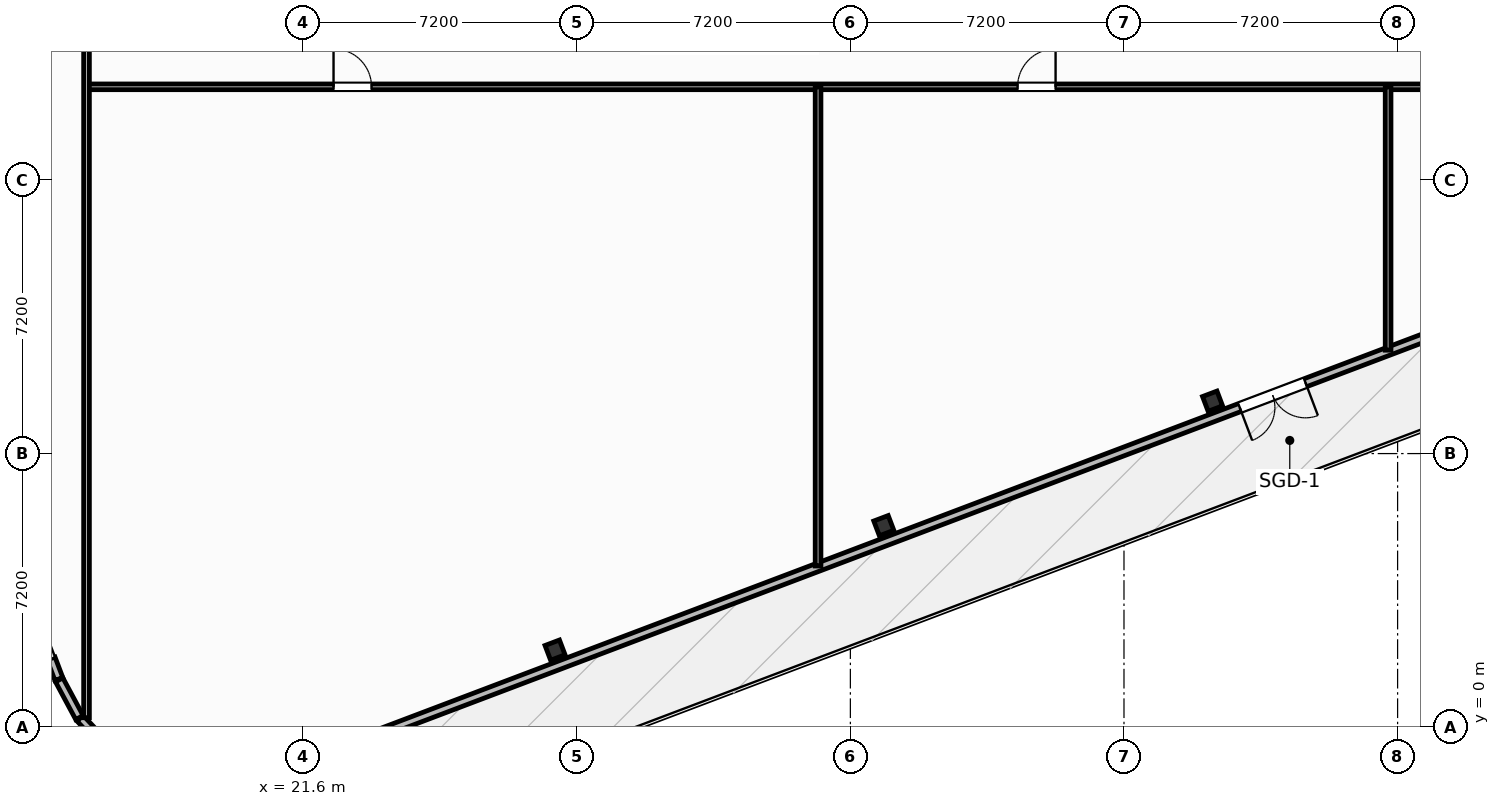
"""IFC4 building model, lengths in metres.
Left out: names, types, materials, properties, quantities, classifications, styles, units other than length and angle.
Written with IfcOpenShell. Run it as: python <this file> out.ifc"""

import sys

from ifc_helpers import new_model, si_unit, direction, frame, frame_2d, origin, origin_2d, place, context, subcontext, project, spatial, rectangle, i_section, extrude, element, fill, save


model = new_model("IFC4")
c1 = context("Model", 3, precision=1e-05, world=origin(), true_north=direction((0.0, 1.0)))
c2 = subcontext(c1, "Body", "Model", "MODEL_VIEW")
j1 = project(units=[si_unit("LENGTHUNIT", "METRE"), si_unit("PLANEANGLEUNIT", "RADIAN")], contexts=[c1])
p1 = place(None, origin())
s1 = spatial("IfcSite", under=j1, at=p1, CompositionType="ELEMENT")
p2 = place(p1, origin())
s2 = spatial("IfcBuilding", under=s1, at=p2, CompositionType="ELEMENT")
p3 = place(p2, frame((0.0, 0.0, 207.9)))
s3 = spatial("IfcBuildingStorey", under=s2, at=p3, CompositionType="ELEMENT", Elevation=207.9)
for number, where, z_axis, x_axis in (
    (1, (28.229, 2.028, -0.32), (0.0, 0.0, 1.0), (0.935, 0.354, 0.0)),
    (2, (36.88, 5.303, -0.32), (0.0, 0.0, 1.0), (0.935, 0.354, 0.0)),
    (3, (45.531, 8.578, -0.32), (0.0, 0.0, 1.0), (0.935, 0.354, 0.0)),
):
    element("IfcColumn", number, at=place(p3, frame(where, z_axis=z_axis, x_axis=x_axis)), inside=s3, PredefinedType="COLUMN", context=c2, shape_type="SweptSolid", body=[
        extrude(i_section(OverallWidth=0.406, OverallDepth=0.416, WebThickness=0.03, FlangeThickness=0.048, FilletRadius=0.025, at=origin_2d()), origin(), (0.0, 0.0, 1.0), 5.12),
    ])
p4 = place(p3, frame((70.085, 17.436, 0.0), z_axis=(0.0, 0.0, 1.0), x_axis=(-0.935222646765, -0.354060165759, 0.0)))
e4 = element("IfcWall", 4, at=p4, inside=s3, PredefinedType="SOLIDWALL", context=c2, shape_type="SweptSolid", body=[
    extrude(rectangle(XDim=52.2, YDim=0.22, at=frame_2d((26.1, 0.0))), origin(), (0.0, 0.0, 1.0), 3.83),
])
p5 = place(p4, frame((23.64, 0.0, 0.0)))
e5 = element("IfcOpeningElement", 5, at=p5, cuts=e4, PredefinedType="OPENING", context=c2, shape_type="SweptSolid", body=[
    extrude(rectangle(XDim=1.85, YDim=2.3, at=frame_2d((0.925, 1.15))), frame((0.0, 0.12, 0.0), z_axis=(0.0, -1.0, 0.0), x_axis=(1.0, 0.0, 0.0)), (0.0, 0.0, 1.0), 0.24),
])
p6 = place(p4, frame((0.55, 0.0, 0.75)))
e6 = element("IfcOpeningElement", 6, at=p6, cuts=e4, PredefinedType="OPENING", context=c2, shape_type="SweptSolid", body=[
    extrude(rectangle(XDim=1.85, YDim=1.75, at=frame_2d((0.925, 0.875))), frame((0.0, 0.12, 0.0), z_axis=(0.0, -1.0, 0.0), x_axis=(1.0, 0.0, 0.0)), (0.0, 0.0, 1.0), 0.24),
])
p7 = place(p4, frame((49.8, 0.0, 0.75)))
e7 = element("IfcOpeningElement", 7, at=p7, cuts=e4, PredefinedType="OPENING", context=c2, shape_type="SweptSolid", body=[
    extrude(rectangle(XDim=1.85, YDim=1.75, at=frame_2d((0.925, 0.875))), frame((0.0, 0.12, 0.0), z_axis=(0.0, -1.0, 0.0), x_axis=(1.0, 0.0, 0.0)), (0.0, 0.0, 1.0), 0.24),
])
p8 = place(p3, frame((15.181, 1.245, 0.0), z_axis=(0.0, 0.0, 1.0), x_axis=(0.473154714138, -0.880979350773, 0.0)))
e8 = element("IfcWall", 8, at=p8, inside=s3, PredefinedType="SOLIDWALL", context=c2, shape_type="SweptSolid", body=[
    extrude(rectangle(XDim=1.125, YDim=0.22, at=frame_2d((0.562, 0.0))), origin(), (0.0, 0.0, 1.0), 3.83),
])
p9 = place(p3, frame((15.73, 0.236, 0.0), z_axis=(0.0, 0.0, 1.0), x_axis=(0.684974096147, -0.728567421456, 0.0)))
e9 = element("IfcWall", 9, at=p9, inside=s3, PredefinedType="SOLIDWALL", context=c2, shape_type="SweptSolid", body=[
    extrude(rectangle(XDim=1.092, YDim=0.22, at=frame_2d((0.546, 0.0))), origin(), (0.0, 0.0, 1.0), 3.83),
])
p10 = place(p3, frame((14.968, 1.809, 0.0), z_axis=(0.0, 0.0, 1.0), x_axis=(0.354042098677, -0.935229486471, 0.0)))
e10 = element("IfcWall", 10, at=p10, inside=s3, PredefinedType="SOLIDWALL", context=c2, shape_type="SweptSolid", body=[
    extrude(rectangle(XDim=0.577, YDim=0.22, at=frame_2d((0.289, 0.0))), origin(), (0.0, 0.0, 1.0), 3.83),
])
p11 = place(p3, frame((15.9, 16.85, 0.0), z_axis=(0.0, 0.0, 1.0), x_axis=(1.0, 0.0, 0.0)))
e11 = element("IfcWall", 11, at=p11, inside=s3, PredefinedType="PARTITIONING", context=c2, shape_type="SweptSolid", body=[
    extrude(rectangle(XDim=50.1, YDim=0.15, at=frame_2d((25.05, 0.0))), origin(), (0.0, 0.0, 1.0), 4.55),
])
p12 = place(p11, frame((6.5, 0.0, 0.0)))
e12 = element("IfcOpeningElement", 12, at=p12, cuts=e11, PredefinedType="OPENING", context=c2, shape_type="SweptSolid", body=[
    extrude(rectangle(XDim=1.0, YDim=2.05, at=frame_2d((0.5, 1.025))), frame((0.0, 0.085, 0.0), z_axis=(0.0, -1.0, 0.0), x_axis=(1.0, 0.0, 0.0)), (0.0, 0.0, 1.0), 0.17),
])
p13 = place(p11, frame((24.5, 0.0, 0.0)))
e13 = element("IfcOpeningElement", 13, at=p13, cuts=e11, PredefinedType="OPENING", context=c2, shape_type="SweptSolid", body=[
    extrude(rectangle(XDim=1.0, YDim=2.05, at=frame_2d((0.5, 1.025))), frame((0.0, 0.085, 0.0), z_axis=(0.0, -1.0, 0.0), x_axis=(1.0, 0.0, 0.0)), (0.0, 0.0, 1.0), 0.17),
])
p14 = place(p11, frame((38.5, 0.0, 0.0)))
e14 = element("IfcOpeningElement", 14, at=p14, cuts=e11, PredefinedType="OPENING", context=c2, shape_type="SweptSolid", body=[
    extrude(rectangle(XDim=1.0, YDim=2.05, at=frame_2d((0.5, 1.025))), frame((0.0, 0.085, 0.0), z_axis=(0.0, -1.0, 0.0), x_axis=(1.0, 0.0, 0.0)), (0.0, 0.0, 1.0), 0.17),
])
p15 = place(p3, frame((35.15, 4.242, 0.0), z_axis=(0.0, 0.0, 1.0), x_axis=(0.0, 1.0, 0.0)))
e15 = element("IfcWall", 15, at=p15, inside=s3, PredefinedType="PARTITIONING", context=c2, shape_type="SweptSolid", body=[
    extrude(rectangle(XDim=12.608, YDim=0.15, at=frame_2d((6.304, 0.0))), origin(), (0.0, 0.0, 1.0), 3.839),
])
p16 = place(p3, frame((50.15, 9.921, 0.0), z_axis=(0.0, 0.0, 1.0), x_axis=(0.0, 1.0, 0.0)))
e16 = element("IfcWall", 16, at=p16, inside=s3, PredefinedType="PARTITIONING", context=c2, shape_type="SweptSolid", body=[
    extrude(rectangle(XDim=6.929, YDim=0.15, at=frame_2d((3.465, 0.0))), origin(), (0.0, 0.0, 1.0), 4.55),
])
p17 = place(p3, frame((15.9, 0.25, 0.0), z_axis=(0.0, 0.0, 1.0), x_axis=(0.0, 1.0, 0.0)))
e17 = element("IfcWall", 17, at=p17, inside=s3, PredefinedType="PARTITIONING", context=c2, shape_type="SweptSolid", body=[
    extrude(rectangle(XDim=35.754, YDim=0.15, at=frame_2d((17.877, 0.0))), origin(), (0.0, 0.0, 1.0), 4.55),
])
p18 = place(p17, frame((27.2, 0.0, 0.0)))
e18 = element("IfcOpeningElement", 18, at=p18, cuts=e17, PredefinedType="OPENING", context=c2, shape_type="SweptSolid", body=[
    extrude(rectangle(XDim=1.0, YDim=2.05, at=frame_2d((0.5, 1.025))), frame((0.0, 0.085, 0.0), z_axis=(0.0, -1.0, 0.0), x_axis=(1.0, 0.0, 0.0)), (0.0, 0.0, 1.0), 0.17),
])
p19 = place(p5, origin())
e19 = element("IfcDoor", 19, at=p19, inside=s3, OperationType="DOUBLE_DOOR_SINGLE_SWING", PredefinedType="DOOR", context=c2, shape_type="SweptSolid", body=[
    extrude(rectangle(XDim=1.85, YDim=2.3, at=frame_2d((0.925, 1.15))), frame((0.0, 0.025, 0.0), z_axis=(0.0, -1.0, 0.0), x_axis=(1.0, 0.0, 0.0)), (0.0, 0.0, 1.0), 0.05),
])
fill(e5, e19)
p20 = place(p12, origin())
e20 = element("IfcDoor", 20, at=p20, inside=s3, OperationType="SINGLE_SWING_LEFT", PredefinedType="DOOR", context=c2, shape_type="SweptSolid", body=[
    extrude(rectangle(XDim=1.0, YDim=2.05, at=frame_2d((0.5, 1.025))), frame((0.0, 0.025, 0.0), z_axis=(0.0, -1.0, 0.0), x_axis=(1.0, 0.0, 0.0)), (0.0, 0.0, 1.0), 0.05),
])
fill(e12, e20)
p21 = place(p13, origin())
e21 = element("IfcDoor", 21, at=p21, inside=s3, OperationType="SINGLE_SWING_RIGHT", PredefinedType="DOOR", context=c2, shape_type="SweptSolid", body=[
    extrude(rectangle(XDim=1.0, YDim=2.05, at=frame_2d((0.5, 1.025))), frame((0.0, 0.025, 0.0), z_axis=(0.0, -1.0, 0.0), x_axis=(1.0, 0.0, 0.0)), (0.0, 0.0, 1.0), 0.05),
])
fill(e13, e21)
save(model, sys.argv[1])
